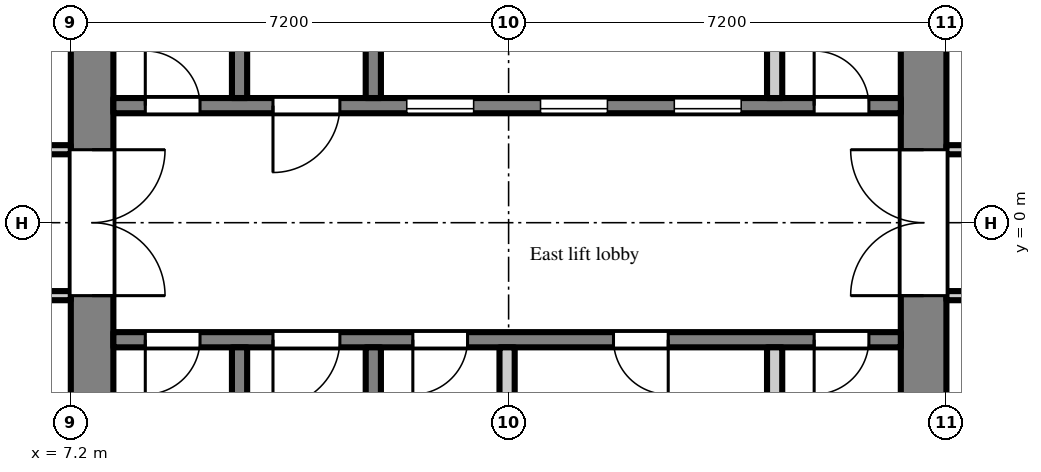
"""IFC4 building model, lengths in metres.
Left out: names, types, materials, properties, quantities, classifications, styles, units other than length and angle.
Written with IfcOpenShell. Run it as: python <this file> out.ifc"""

import sys

from ifc_helpers import new_model, si_unit, direction, frame, frame_2d, origin, place, context, subcontext, project, spatial, polyline, rectangle, outline, extrude, element, fill, save


model = new_model("IFC4")
c1 = context("Model", 3, precision=1e-05, world=origin(), true_north=direction((0.0, 1.0)))
c2 = subcontext(c1, "Body", "Model", "MODEL_VIEW")
j1 = project(units=[si_unit("LENGTHUNIT", "METRE"), si_unit("PLANEANGLEUNIT", "RADIAN")], contexts=[c1])
p1 = place(None, origin())
s1 = spatial("IfcSite", under=j1, at=p1, CompositionType="ELEMENT")
p2 = place(p1, origin())
s2 = spatial("IfcBuilding", under=s1, at=p2, CompositionType="ELEMENT")
p3 = place(p2, frame((0.0, 0.0, 162.3)))
s3 = spatial("IfcBuildingStorey", under=s2, at=p3, CompositionType="ELEMENT", Elevation=162.3)
p4 = place(p3, frame((7.55, -7.2, 0.0), z_axis=(0.0, 0.0, 1.0), x_axis=(0.0, 1.0, 0.0)))
e1 = element("IfcWall", 1, at=p4, inside=s3, PredefinedType="SHEAR", context=c2, shape_type="SweptSolid", body=[
    extrude(rectangle(XDim=14.4, YDim=0.7, at=frame_2d((7.2, 0.0))), origin(), (0.0, 0.0, 1.0), 3.8),
])
p5 = place(p4, frame((6.0, 0.0, 0.0)))
e2 = element("IfcOpeningElement", 2, at=p5, cuts=e1, PredefinedType="OPENING", context=c2, shape_type="SweptSolid", body=[
    extrude(rectangle(XDim=2.4, YDim=2.2, at=frame_2d((1.2, 1.1))), frame((0.0, 0.36, 0.0), z_axis=(0.0, -1.0, 0.0), x_axis=(1.0, 0.0, 0.0)), (0.0, 0.0, 1.0), 0.72),
])
p6 = place(p3, frame((21.225, -7.2, 0.0), z_axis=(0.0, 0.0, 1.0), x_axis=(0.0, 1.0, 0.0)))
e3 = element("IfcWall", 3, at=p6, inside=s3, PredefinedType="SHEAR", context=c2, shape_type="SweptSolid", body=[
    extrude(rectangle(XDim=14.4, YDim=0.75, at=frame_2d((7.2, 0.0))), origin(), (0.0, 0.0, 1.0), 3.8),
])
p7 = place(p6, frame((6.0, 0.0, 0.0)))
e4 = element("IfcOpeningElement", 4, at=p7, cuts=e3, PredefinedType="OPENING", context=c2, shape_type="SweptSolid", body=[
    extrude(rectangle(XDim=2.4, YDim=2.2, at=frame_2d((1.2, 1.1))), frame((0.0, 0.385, 0.0), z_axis=(0.0, -1.0, 0.0), x_axis=(1.0, 0.0, 0.0)), (0.0, 0.0, 1.0), 0.77),
])
p8 = place(p3, frame((7.9, 1.925, 0.0), z_axis=(0.0, 0.0, 1.0), x_axis=(1.0, 0.0, 0.0)))
e5 = element("IfcWall", 5, at=p8, inside=s3, PredefinedType="SHEAR", context=c2, shape_type="SweptSolid", body=[
    extrude(rectangle(XDim=12.95, YDim=0.25, at=frame_2d((6.475, 0.0))), origin(), (0.0, 0.0, 1.0), 3.8),
])
p9 = place(p8, frame((4.825, 0.0, 0.0)))
e6 = element("IfcOpeningElement", 6, at=p9, cuts=e5, PredefinedType="OPENING", context=c2, shape_type="SweptSolid", body=[
    extrude(rectangle(XDim=1.1, YDim=2.1, at=frame_2d((0.55, 1.05))), frame((0.0, 0.135, 0.0), z_axis=(0.0, -1.0, 0.0), x_axis=(1.0, 0.0, 0.0)), (0.0, 0.0, 1.0), 0.27),
])
p10 = place(p8, frame((7.025, 0.0, 0.0)))
e7 = element("IfcOpeningElement", 7, at=p10, cuts=e5, PredefinedType="OPENING", context=c2, shape_type="SweptSolid", body=[
    extrude(rectangle(XDim=1.1, YDim=2.1, at=frame_2d((0.55, 1.05))), frame((0.0, 0.135, 0.0), z_axis=(0.0, -1.0, 0.0), x_axis=(1.0, 0.0, 0.0)), (0.0, 0.0, 1.0), 0.27),
])
p11 = place(p8, frame((9.225, 0.0, 0.0)))
e8 = element("IfcOpeningElement", 8, at=p11, cuts=e5, PredefinedType="OPENING", context=c2, shape_type="SweptSolid", body=[
    extrude(rectangle(XDim=1.1, YDim=2.1, at=frame_2d((0.55, 1.05))), frame((0.0, 0.135, 0.0), z_axis=(0.0, -1.0, 0.0), x_axis=(1.0, 0.0, 0.0)), (0.0, 0.0, 1.0), 0.27),
])
p12 = place(p8, frame((0.525, 0.0, 0.0)))
e9 = element("IfcOpeningElement", 9, at=p12, cuts=e5, PredefinedType="OPENING", context=c2, shape_type="SweptSolid", body=[
    extrude(rectangle(XDim=0.9, YDim=2.1, at=frame_2d((0.45, 1.05))), frame((0.0, 0.135, 0.0), z_axis=(0.0, -1.0, 0.0), x_axis=(1.0, 0.0, 0.0)), (0.0, 0.0, 1.0), 0.27),
])
p13 = place(p8, frame((2.625, 0.0, 0.0)))
e10 = element("IfcOpeningElement", 10, at=p13, cuts=e5, PredefinedType="OPENING", context=c2, shape_type="SweptSolid", body=[
    extrude(rectangle(XDim=1.1, YDim=2.1, at=frame_2d((0.55, 1.05))), frame((0.0, 0.135, 0.0), z_axis=(0.0, -1.0, 0.0), x_axis=(1.0, 0.0, 0.0)), (0.0, 0.0, 1.0), 0.27),
])
p14 = place(p8, frame((11.525, 0.0, 0.0)))
e11 = element("IfcOpeningElement", 11, at=p14, cuts=e5, PredefinedType="OPENING", context=c2, shape_type="SweptSolid", body=[
    extrude(rectangle(XDim=0.9, YDim=2.1, at=frame_2d((0.45, 1.05))), frame((0.0, 0.135, 0.0), z_axis=(0.0, -1.0, 0.0), x_axis=(1.0, 0.0, 0.0)), (0.0, 0.0, 1.0), 0.27),
])
p15 = place(p3, frame((9.975, 2.05, 0.0), z_axis=(0.0, 0.0, 1.0), x_axis=(0.0, 1.0, 0.0)))
e12 = element("IfcWall", 12, at=p15, inside=s3, PredefinedType="SHEAR", context=c2, shape_type="SweptSolid", body=[
    extrude(rectangle(XDim=4.7, YDim=0.25, at=frame_2d((2.35, 0.0))), origin(), (0.0, 0.0, 1.0), 3.8),
])
p16 = place(p15, frame((2.95, 0.0, 0.0)))
e13 = element("IfcOpeningElement", 13, at=p16, cuts=e12, PredefinedType="OPENING", context=c2, shape_type="SweptSolid", body=[
    extrude(rectangle(XDim=1.1, YDim=2.1, at=frame_2d((0.55, 1.05))), frame((0.0, 0.135, 0.0), z_axis=(0.0, -1.0, 0.0), x_axis=(1.0, 0.0, 0.0)), (0.0, 0.0, 1.0), 0.27),
])
p17 = place(p3, frame((12.175, 2.05, 0.0), z_axis=(0.0, 0.0, 1.0), x_axis=(0.0, 1.0, 0.0)))
e14 = element("IfcWall", 14, at=p17, inside=s3, PredefinedType="SHEAR", context=c2, shape_type="SweptSolid", body=[
    extrude(rectangle(XDim=4.7, YDim=0.25, at=frame_2d((2.35, 0.0))), origin(), (0.0, 0.0, 1.0), 3.8),
])
p18 = place(p17, frame((2.975, 0.0, 0.0)))
e15 = element("IfcOpeningElement", 15, at=p18, cuts=e14, PredefinedType="OPENING", context=c2, shape_type="SweptSolid", body=[
    extrude(rectangle(XDim=1.1, YDim=2.1, at=frame_2d((0.55, 1.05))), frame((0.0, 0.135, 0.0), z_axis=(0.0, -1.0, 0.0), x_axis=(1.0, 0.0, 0.0)), (0.0, 0.0, 1.0), 0.27),
])
p19 = place(p3, frame((18.775, 2.05, 0.0), z_axis=(0.0, 0.0, 1.0), x_axis=(0.0, 1.0, 0.0)))
e16 = element("IfcWall", 16, at=p19, inside=s3, PredefinedType="PARTITIONING", context=c2, shape_type="SweptSolid", body=[
    extrude(rectangle(XDim=2.1, YDim=0.25, at=frame_2d((1.05, 0.0))), origin(), (0.0, 0.0, 1.0), 3.8),
])
p20 = place(p3, frame((7.9, -1.925, 0.0), z_axis=(0.0, 0.0, 1.0), x_axis=(1.0, 0.0, 0.0)))
e17 = element("IfcWall", 17, at=p20, inside=s3, PredefinedType="SHEAR", context=c2, shape_type="SweptSolid", body=[
    extrude(rectangle(XDim=12.95, YDim=0.25, at=frame_2d((6.475, 0.0))), origin(), (0.0, 0.0, 1.0), 3.8),
])
p21 = place(p20, frame((0.525, 0.0, 0.0)))
e18 = element("IfcOpeningElement", 18, at=p21, cuts=e17, PredefinedType="OPENING", context=c2, shape_type="SweptSolid", body=[
    extrude(rectangle(XDim=0.9, YDim=2.1, at=frame_2d((0.45, 1.05))), frame((0.0, 0.135, 0.0), z_axis=(0.0, -1.0, 0.0), x_axis=(1.0, 0.0, 0.0)), (0.0, 0.0, 1.0), 0.27),
])
p22 = place(p20, frame((2.625, 0.0, 0.0)))
e19 = element("IfcOpeningElement", 19, at=p22, cuts=e17, PredefinedType="OPENING", context=c2, shape_type="SweptSolid", body=[
    extrude(rectangle(XDim=1.1, YDim=2.1, at=frame_2d((0.55, 1.05))), frame((0.0, 0.135, 0.0), z_axis=(0.0, -1.0, 0.0), x_axis=(1.0, 0.0, 0.0)), (0.0, 0.0, 1.0), 0.27),
])
p23 = place(p20, frame((4.925, 0.0, 0.0)))
e20 = element("IfcOpeningElement", 20, at=p23, cuts=e17, PredefinedType="OPENING", context=c2, shape_type="SweptSolid", body=[
    extrude(rectangle(XDim=0.9, YDim=2.1, at=frame_2d((0.45, 1.05))), frame((0.0, 0.135, 0.0), z_axis=(0.0, -1.0, 0.0), x_axis=(1.0, 0.0, 0.0)), (0.0, 0.0, 1.0), 0.27),
])
p24 = place(p20, frame((8.225, 0.0, 0.0)))
e21 = element("IfcOpeningElement", 21, at=p24, cuts=e17, PredefinedType="OPENING", context=c2, shape_type="SweptSolid", body=[
    extrude(rectangle(XDim=0.9, YDim=2.1, at=frame_2d((0.45, 1.05))), frame((0.0, 0.135, 0.0), z_axis=(0.0, -1.0, 0.0), x_axis=(1.0, 0.0, 0.0)), (0.0, 0.0, 1.0), 0.27),
])
p25 = place(p20, frame((11.525, 0.0, 0.0)))
e22 = element("IfcOpeningElement", 22, at=p25, cuts=e17, PredefinedType="OPENING", context=c2, shape_type="SweptSolid", body=[
    extrude(rectangle(XDim=0.9, YDim=2.1, at=frame_2d((0.45, 1.05))), frame((0.0, 0.135, 0.0), z_axis=(0.0, -1.0, 0.0), x_axis=(1.0, 0.0, 0.0)), (0.0, 0.0, 1.0), 0.27),
])
p26 = place(p3, frame((9.975, -2.05, 0.0), z_axis=(0.0, 0.0, 1.0), x_axis=(0.0, -1.0, 0.0)))
e23 = element("IfcWall", 23, at=p26, inside=s3, PredefinedType="SHEAR", context=c2, shape_type="SweptSolid", body=[
    extrude(rectangle(XDim=4.7, YDim=0.25, at=frame_2d((2.35, 0.0))), origin(), (0.0, 0.0, 1.0), 3.8),
])
p27 = place(p26, frame((2.95, 0.0, 0.0)))
e24 = element("IfcOpeningElement", 24, at=p27, cuts=e23, PredefinedType="OPENING", context=c2, shape_type="SweptSolid", body=[
    extrude(rectangle(XDim=1.1, YDim=2.1, at=frame_2d((0.55, 1.05))), frame((0.0, 0.135, 0.0), z_axis=(0.0, -1.0, 0.0), x_axis=(1.0, 0.0, 0.0)), (0.0, 0.0, 1.0), 0.27),
])
p28 = place(p3, frame((12.175, -2.05, 0.0), z_axis=(0.0, 0.0, 1.0), x_axis=(0.0, -1.0, 0.0)))
e25 = element("IfcWall", 25, at=p28, inside=s3, PredefinedType="SHEAR", context=c2, shape_type="SweptSolid", body=[
    extrude(rectangle(XDim=4.7, YDim=0.25, at=frame_2d((2.35, 0.0))), origin(), (0.0, 0.0, 1.0), 3.8),
])
p29 = place(p28, frame((2.975, 0.0, 0.0)))
e26 = element("IfcOpeningElement", 26, at=p29, cuts=e25, PredefinedType="OPENING", context=c2, shape_type="SweptSolid", body=[
    extrude(rectangle(XDim=1.1, YDim=2.1, at=frame_2d((0.55, 1.05))), frame((0.0, 0.135, 0.0), z_axis=(0.0, -1.0, 0.0), x_axis=(1.0, 0.0, 0.0)), (0.0, 0.0, 1.0), 0.27),
])
for number, where, z_axis, x_axis in (
    (27, (14.375, -2.05, 0.0), (0.0, 0.0, 1.0), (0.0, -1.0, 0.0)),
    (28, (18.775, -2.05, 0.0), (0.0, 0.0, 1.0), (0.0, -1.0, 0.0)),
):
    element("IfcWall", number, at=place(p3, frame(where, z_axis=z_axis, x_axis=x_axis)), inside=s3, PredefinedType="PARTITIONING", context=c2, shape_type="SweptSolid", body=[
        extrude(rectangle(XDim=2.1, YDim=0.25, at=frame_2d((1.05, 0.0))), origin(), (0.0, 0.0, 1.0), 3.8),
    ])
p30 = place(p3, frame((1.275, -1.2, 0.0), z_axis=(0.0, 0.0, 1.0), x_axis=(1.0, 0.0, 0.0)))
e29 = element("IfcWall", 29, at=p30, inside=s3, PredefinedType="PARTITIONING", context=c2, shape_type="SweptSolid", body=[
    extrude(rectangle(XDim=5.925, YDim=0.15, at=frame_2d((2.962, 0.0))), origin(), (0.0, 0.0, 1.0), 3.8),
])
p31 = place(p30, frame((0.1, 0.0, 0.0)))
e30 = element("IfcOpeningElement", 30, at=p31, cuts=e29, PredefinedType="OPENING", context=c2, shape_type="SweptSolid", body=[
    extrude(rectangle(XDim=0.9, YDim=2.1, at=frame_2d((0.45, 1.05))), frame((0.0, 0.085, 0.0), z_axis=(0.0, -1.0, 0.0), x_axis=(1.0, 0.0, 0.0)), (0.0, 0.0, 1.0), 0.17),
])
p32 = place(p30, frame((4.075, 0.0, 0.0)))
e31 = element("IfcOpeningElement", 31, at=p32, cuts=e29, PredefinedType="OPENING", context=c2, shape_type="SweptSolid", body=[
    extrude(rectangle(XDim=1.2, YDim=2.1, at=frame_2d((0.6, 1.05))), frame((0.0, 0.085, 0.0), z_axis=(0.0, -1.0, 0.0), x_axis=(1.0, 0.0, 0.0)), (0.0, 0.0, 1.0), 0.17),
])
p33 = place(p3, frame((1.275, 1.2, 0.0), z_axis=(0.0, 0.0, 1.0), x_axis=(1.0, 0.0, 0.0)))
e32 = element("IfcWall", 32, at=p33, inside=s3, PredefinedType="PARTITIONING", context=c2, shape_type="SweptSolid", body=[
    extrude(rectangle(XDim=5.925, YDim=0.15, at=frame_2d((2.962, 0.0))), origin(), (0.0, 0.0, 1.0), 3.8),
])
p34 = place(p33, frame((3.875, 0.0, 0.0)))
e33 = element("IfcOpeningElement", 33, at=p34, cuts=e32, PredefinedType="OPENING", context=c2, shape_type="SweptSolid", body=[
    extrude(rectangle(XDim=1.2, YDim=2.1, at=frame_2d((0.6, 1.05))), frame((0.0, 0.085, 0.0), z_axis=(0.0, -1.0, 0.0), x_axis=(1.0, 0.0, 0.0)), (0.0, 0.0, 1.0), 0.17),
])
p35 = place(p3, frame((21.6, -1.2, 0.0), z_axis=(0.0, 0.0, 1.0), x_axis=(1.0, 0.0, 0.0)))
e34 = element("IfcWall", 34, at=p35, inside=s3, PredefinedType="PARTITIONING", context=c2, shape_type="SweptSolid", body=[
    extrude(outline(polyline([(0.0, 0.0), (14.9, 0.0), (14.9, 3.8), (9.602, 3.8), (9.6, 3.4), (8.8, 3.4), (8.798, 3.8), (0.0, 3.8), (0.0, 0.0)])), frame((0.0, 0.075, 0.0), z_axis=(0.0, -1.0, 0.0), x_axis=(1.0, 0.0, 0.0)), (0.0, 0.0, 1.0), 0.15),
])
p36 = place(p35, frame((1.2, 0.0, 0.0)))
e35 = element("IfcOpeningElement", 35, at=p36, cuts=e34, PredefinedType="OPENING", context=c2, shape_type="SweptSolid", body=[
    extrude(rectangle(XDim=1.2, YDim=2.1, at=frame_2d((0.6, 1.05))), frame((0.0, 0.085, 0.0), z_axis=(0.0, -1.0, 0.0), x_axis=(1.0, 0.0, 0.0)), (0.0, 0.0, 1.0), 0.17),
])
p37 = place(p35, frame((9.25, 0.0, 0.0)))
e36 = element("IfcOpeningElement", 36, at=p37, cuts=e34, PredefinedType="OPENING", context=c2, shape_type="SweptSolid", body=[
    extrude(rectangle(XDim=0.9, YDim=2.1, at=frame_2d((0.45, 1.05))), frame((0.0, 0.085, 0.0), z_axis=(0.0, -1.0, 0.0), x_axis=(1.0, 0.0, 0.0)), (0.0, 0.0, 1.0), 0.17),
])
p38 = place(p35, frame((12.25, 0.0, 0.0)))
e37 = element("IfcOpeningElement", 37, at=p38, cuts=e34, PredefinedType="OPENING", context=c2, shape_type="SweptSolid", body=[
    extrude(rectangle(XDim=1.2, YDim=2.1, at=frame_2d((0.6, 1.05))), frame((0.0, 0.085, 0.0), z_axis=(0.0, -1.0, 0.0), x_axis=(1.0, 0.0, 0.0)), (0.0, 0.0, 1.0), 0.17),
])
p39 = place(p3, frame((21.6, 1.2, 0.0), z_axis=(0.0, 0.0, 1.0), x_axis=(1.0, 0.0, 0.0)))
e38 = element("IfcWall", 38, at=p39, inside=s3, PredefinedType="PARTITIONING", context=c2, shape_type="SweptSolid", body=[
    extrude(outline(polyline([(0.0, 0.0), (14.9, 0.0), (14.9, 3.8), (9.602, 3.8), (9.6, 3.4), (8.8, 3.4), (8.798, 3.8), (0.0, 3.8), (0.0, 0.0)])), frame((0.0, 0.075, 0.0), z_axis=(0.0, -1.0, 0.0), x_axis=(1.0, 0.0, 0.0)), (0.0, 0.0, 1.0), 0.15),
])
p40 = place(p39, frame((0.65, 0.0, 0.0)))
e39 = element("IfcOpeningElement", 39, at=p40, cuts=e38, PredefinedType="OPENING", context=c2, shape_type="SweptSolid", body=[
    extrude(rectangle(XDim=1.2, YDim=2.1, at=frame_2d((0.6, 1.05))), frame((0.0, 0.085, 0.0), z_axis=(0.0, -1.0, 0.0), x_axis=(1.0, 0.0, 0.0)), (0.0, 0.0, 1.0), 0.17),
])
p41 = place(p39, frame((4.8, 0.0, 0.0)))
e40 = element("IfcOpeningElement", 40, at=p41, cuts=e38, PredefinedType="OPENING", context=c2, shape_type="SweptSolid", body=[
    extrude(rectangle(XDim=1.2, YDim=2.1, at=frame_2d((0.6, 1.05))), frame((0.0, 0.085, 0.0), z_axis=(0.0, -1.0, 0.0), x_axis=(1.0, 0.0, 0.0)), (0.0, 0.0, 1.0), 0.17),
])
p42 = place(p39, frame((10.15, 0.0, 0.0)))
e41 = element("IfcOpeningElement", 41, at=p42, cuts=e38, PredefinedType="OPENING", context=c2, shape_type="SweptSolid", body=[
    extrude(rectangle(XDim=1.8, YDim=2.1, at=frame_2d((0.9, 1.05))), frame((0.0, 0.085, 0.0), z_axis=(0.0, -1.0, 0.0), x_axis=(1.0, 0.0, 0.0)), (0.0, 0.0, 1.0), 0.17),
])
p43 = place(p9, origin())
e42 = element("IfcDoor", 42, at=p43, inside=s3, OperationType="SLIDING_TO_LEFT", PredefinedType="DOOR", context=c2, shape_type="SweptSolid", body=[
    extrude(rectangle(XDim=1.1, YDim=2.1, at=frame_2d((0.55, 1.05))), frame((0.0, 0.025, 0.0), z_axis=(0.0, -1.0, 0.0), x_axis=(1.0, 0.0, 0.0)), (0.0, 0.0, 1.0), 0.05),
])
fill(e6, e42)
p44 = place(p10, origin())
e43 = element("IfcDoor", 43, at=p44, inside=s3, OperationType="SLIDING_TO_LEFT", PredefinedType="DOOR", context=c2, shape_type="SweptSolid", body=[
    extrude(rectangle(XDim=1.1, YDim=2.1, at=frame_2d((0.55, 1.05))), frame((0.0, 0.025, 0.0), z_axis=(0.0, -1.0, 0.0), x_axis=(1.0, 0.0, 0.0)), (0.0, 0.0, 1.0), 0.05),
])
fill(e7, e43)
p45 = place(p11, origin())
e44 = element("IfcDoor", 44, at=p45, inside=s3, OperationType="SLIDING_TO_LEFT", PredefinedType="DOOR", context=c2, shape_type="SweptSolid", body=[
    extrude(rectangle(XDim=1.1, YDim=2.1, at=frame_2d((0.55, 1.05))), frame((0.0, 0.025, 0.0), z_axis=(0.0, -1.0, 0.0), x_axis=(1.0, 0.0, 0.0)), (0.0, 0.0, 1.0), 0.05),
])
fill(e8, e44)
p46 = place(p12, origin())
e45 = element("IfcDoor", 45, at=p46, inside=s3, OperationType="SINGLE_SWING_LEFT", PredefinedType="DOOR", context=c2, shape_type="SweptSolid", body=[
    extrude(rectangle(XDim=0.9, YDim=2.1, at=frame_2d((0.45, 1.05))), frame((0.0, 0.025, 0.0), z_axis=(0.0, -1.0, 0.0), x_axis=(1.0, 0.0, 0.0)), (0.0, 0.0, 1.0), 0.05),
])
fill(e9, e45)
p47 = place(p21, frame((0.9, 0.0, 0.0), z_axis=(0.0, 0.0, 1.0), x_axis=(-1.0, 0.0, 0.0)))
e46 = element("IfcDoor", 46, at=p47, inside=s3, OperationType="SINGLE_SWING_RIGHT", PredefinedType="DOOR", context=c2, shape_type="SweptSolid", body=[
    extrude(rectangle(XDim=0.9, YDim=2.1, at=frame_2d((0.45, 1.05))), frame((0.0, 0.025, 0.0), z_axis=(0.0, -1.0, 0.0), x_axis=(1.0, 0.0, 0.0)), (0.0, 0.0, 1.0), 0.05),
])
fill(e18, e46)
p48 = place(p13, frame((1.1, 0.0, 0.0), z_axis=(0.0, 0.0, 1.0), x_axis=(-1.0, 0.0, 0.0)))
e47 = element("IfcDoor", 47, at=p48, inside=s3, OperationType="SINGLE_SWING_RIGHT", PredefinedType="DOOR", context=c2, shape_type="SweptSolid", body=[
    extrude(rectangle(XDim=1.1, YDim=2.1, at=frame_2d((0.55, 1.05))), frame((0.0, 0.025, 0.0), z_axis=(0.0, -1.0, 0.0), x_axis=(1.0, 0.0, 0.0)), (0.0, 0.0, 1.0), 0.05),
])
fill(e10, e47)
p49 = place(p22, frame((1.1, 0.0, 0.0), z_axis=(0.0, 0.0, 1.0), x_axis=(-1.0, 0.0, 0.0)))
e48 = element("IfcDoor", 48, at=p49, inside=s3, OperationType="SINGLE_SWING_RIGHT", PredefinedType="DOOR", context=c2, shape_type="SweptSolid", body=[
    extrude(rectangle(XDim=1.1, YDim=2.1, at=frame_2d((0.55, 1.05))), frame((0.0, 0.025, 0.0), z_axis=(0.0, -1.0, 0.0), x_axis=(1.0, 0.0, 0.0)), (0.0, 0.0, 1.0), 0.05),
])
fill(e19, e48)
p50 = place(p5, frame((2.4, 0.0, 0.0), z_axis=(0.0, 0.0, 1.0), x_axis=(-1.0, 0.0, 0.0)))
e49 = element("IfcDoor", 49, at=p50, inside=s3, OperationType="DOUBLE_DOOR_DOUBLE_SWING", PredefinedType="DOOR", context=c2, shape_type="SweptSolid", body=[
    extrude(rectangle(XDim=2.4, YDim=2.2, at=frame_2d((1.2, 1.1))), frame((0.0, 0.025, 0.0), z_axis=(0.0, -1.0, 0.0), x_axis=(1.0, 0.0, 0.0)), (0.0, 0.0, 1.0), 0.05),
])
fill(e2, e49)
p51 = place(p7, origin())
e50 = element("IfcDoor", 50, at=p51, inside=s3, OperationType="DOUBLE_DOOR_DOUBLE_SWING", PredefinedType="DOOR", context=c2, shape_type="SweptSolid", body=[
    extrude(rectangle(XDim=2.4, YDim=2.2, at=frame_2d((1.2, 1.1))), frame((0.0, 0.025, 0.0), z_axis=(0.0, -1.0, 0.0), x_axis=(1.0, 0.0, 0.0)), (0.0, 0.0, 1.0), 0.05),
])
fill(e4, e50)
p52 = place(p14, origin())
e51 = element("IfcDoor", 51, at=p52, inside=s3, OperationType="SINGLE_SWING_LEFT", PredefinedType="DOOR", context=c2, shape_type="SweptSolid", body=[
    extrude(rectangle(XDim=0.9, YDim=2.1, at=frame_2d((0.45, 1.05))), frame((0.0, 0.025, 0.0), z_axis=(0.0, -1.0, 0.0), x_axis=(1.0, 0.0, 0.0)), (0.0, 0.0, 1.0), 0.05),
])
fill(e11, e51)
p53 = place(p23, frame((0.9, 0.0, 0.0), z_axis=(0.0, 0.0, 1.0), x_axis=(-1.0, 0.0, 0.0)))
e52 = element("IfcDoor", 52, at=p53, inside=s3, OperationType="SINGLE_SWING_RIGHT", PredefinedType="DOOR", context=c2, shape_type="SweptSolid", body=[
    extrude(rectangle(XDim=0.9, YDim=2.1, at=frame_2d((0.45, 1.05))), frame((0.0, 0.025, 0.0), z_axis=(0.0, -1.0, 0.0), x_axis=(1.0, 0.0, 0.0)), (0.0, 0.0, 1.0), 0.05),
])
fill(e20, e52)
p54 = place(p24, frame((0.9, 0.0, 0.0), z_axis=(0.0, 0.0, 1.0), x_axis=(-1.0, 0.0, 0.0)))
e53 = element("IfcDoor", 53, at=p54, inside=s3, OperationType="SINGLE_SWING_LEFT", PredefinedType="DOOR", context=c2, shape_type="SweptSolid", body=[
    extrude(rectangle(XDim=0.9, YDim=2.1, at=frame_2d((0.45, 1.05))), frame((0.0, 0.025, 0.0), z_axis=(0.0, -1.0, 0.0), x_axis=(1.0, 0.0, 0.0)), (0.0, 0.0, 1.0), 0.05),
])
fill(e21, e53)
p55 = place(p25, frame((0.9, 0.0, 0.0), z_axis=(0.0, 0.0, 1.0), x_axis=(-1.0, 0.0, 0.0)))
e54 = element("IfcDoor", 54, at=p55, inside=s3, OperationType="SINGLE_SWING_RIGHT", PredefinedType="DOOR", context=c2, shape_type="SweptSolid", body=[
    extrude(rectangle(XDim=0.9, YDim=2.1, at=frame_2d((0.45, 1.05))), frame((0.0, 0.025, 0.0), z_axis=(0.0, -1.0, 0.0), x_axis=(1.0, 0.0, 0.0)), (0.0, 0.0, 1.0), 0.05),
])
fill(e22, e54)
save(model, sys.argv[1])
